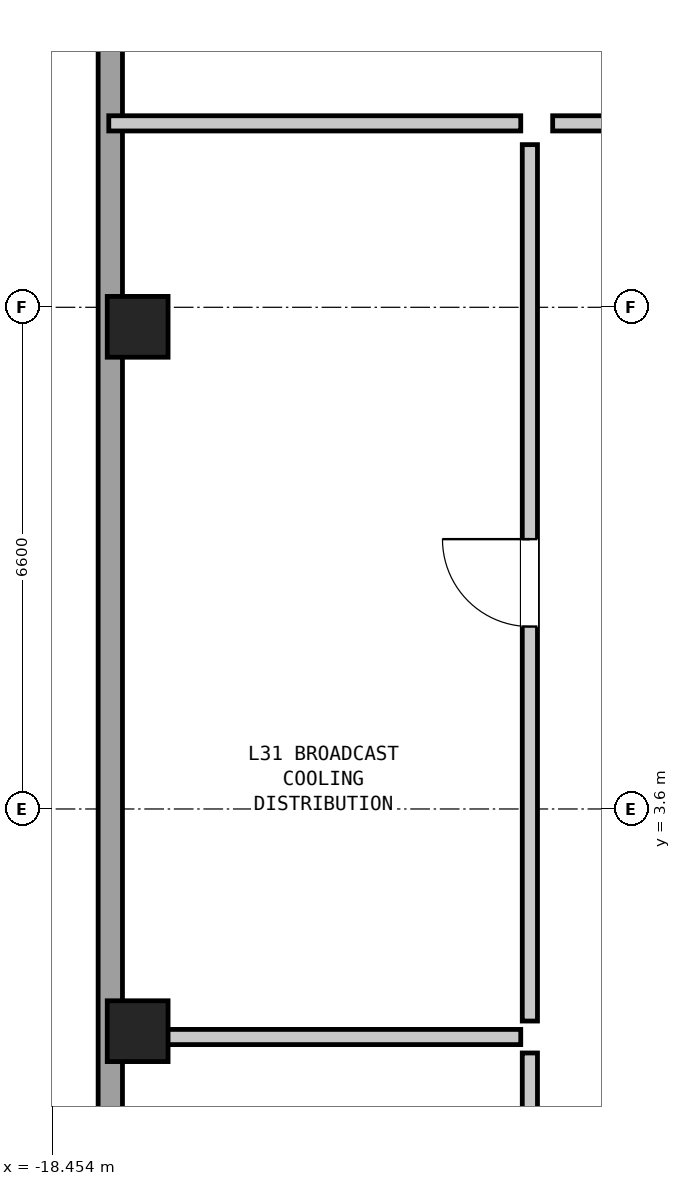
"""IFC4 building model, lengths in metres.
Left out: names, types, materials, properties, quantities, classifications, styles, units other than length and angle.
Written with IfcOpenShell. Run it as: python <this file> out.ifc"""

import sys

from ifc_helpers import new_model, si_unit, direction, frame, frame_2d, origin, origin_2d, place, context, subcontext, project, spatial, rectangle, hollow_rectangle, extrude, element, fill, save


model = new_model("IFC4")
c1 = context("Model", 3, precision=1e-05, world=origin(), true_north=direction((0.0, 1.0)))
c2 = subcontext(c1, "Body", "Model", "MODEL_VIEW")
j1 = project(units=[si_unit("LENGTHUNIT", "METRE"), si_unit("PLANEANGLEUNIT", "RADIAN")], contexts=[c1])
p1 = place(None, origin())
s1 = spatial("IfcSite", under=j1, at=p1, CompositionType="ELEMENT")
p2 = place(p1, origin())
s2 = spatial("IfcBuilding", under=s1, at=p2, CompositionType="ELEMENT")
p3 = place(p2, frame((0.0, 0.0, 108.45)))
s3 = spatial("IfcBuildingStorey", under=s2, at=p3, CompositionType="ELEMENT", Elevation=108.45)
for number, where, z_axis, x_axis in (
    (1, (-17.33, 9.943, 0.0), (0.0, 0.0, 1.0), (0.0, 1.0, 0.0)),
    (2, (-17.33, 0.677, 0.0), (0.0, 0.0, 1.0), (0.0, 1.0, 0.0)),
):
    element("IfcColumn", number, at=place(p3, frame(where, z_axis=z_axis, x_axis=x_axis)), inside=s3, PredefinedType="COLUMN", context=c2, shape_type="SweptSolid", body=[
        extrude(hollow_rectangle(XDim=0.8, YDim=0.8, WallThickness=0.05, at=origin_2d()), origin(), (0.0, 0.0, 1.0), 4.35),
    ])
p4 = place(p3, frame((-17.69, -8.202, 0.0), z_axis=(0.0, 0.0, 1.0), x_axis=(0.0, 1.0, 0.0)))
e3 = element("IfcWall", 3, at=p4, inside=s3, PredefinedType="SOLIDWALL", context=c2, shape_type="SweptSolid", body=[
    extrude(rectangle(XDim=27.024, YDim=0.32, at=frame_2d((13.512, 0.0))), origin(), (0.0, 0.0, 1.0), 2.31),
])
p5 = place(p3, frame((-11.87, 12.62, 0.0), z_axis=(0.0, 0.0, 1.0), x_axis=(1.0, 0.0, 0.0)))
e4 = element("IfcWall", 4, at=p5, inside=s3, PredefinedType="PARTITIONING", context=c2, shape_type="SweptSolid", body=[
    extrude(rectangle(XDim=5.89, YDim=0.2, at=frame_2d((2.945, 0.0))), origin(), (0.0, 0.0, 1.0), 4.13),
])
p6 = place(p5, frame((2.37, 0.0, 0.0)))
e5 = element("IfcOpeningElement", 5, at=p6, cuts=e4, PredefinedType="OPENING", context=c2, shape_type="SweptSolid", body=[
    extrude(rectangle(XDim=1.15, YDim=2.1, at=frame_2d((0.575, 1.05))), frame((0.0, 0.112, 0.0), z_axis=(0.0, -1.0, 0.0), x_axis=(1.0, 0.0, 0.0)), (0.0, 0.0, 1.0), 0.224),
])
p7 = place(p3, frame((-17.71, 12.62, 0.0), z_axis=(0.0, 0.0, 1.0), x_axis=(1.0, 0.0, 0.0)))
e6 = element("IfcWall", 6, at=p7, inside=s3, PredefinedType="PARTITIONING", context=c2, shape_type="SweptSolid", body=[
    extrude(rectangle(XDim=5.42, YDim=0.2, at=frame_2d((2.71, 0.0))), origin(), (0.0, 0.0, 1.0), 4.13),
])
p8 = place(p3, frame((-17.71, 0.6, 0.0), z_axis=(0.0, 0.0, 1.0), x_axis=(1.0, 0.0, 0.0)))
e7 = element("IfcWall", 7, at=p8, inside=s3, PredefinedType="PARTITIONING", context=c2, shape_type="SweptSolid", body=[
    extrude(rectangle(XDim=5.42, YDim=0.2, at=frame_2d((2.71, 0.0))), origin(), (0.0, 0.0, 1.0), 2.31),
])
p9 = place(p3, frame((-12.17, -11.14, 0.0), z_axis=(0.0, 0.0, 1.0), x_axis=(0.0, 1.0, 0.0)))
e8 = element("IfcWall", 8, at=p9, inside=s3, PredefinedType="PARTITIONING", context=c2, shape_type="SweptSolid", body=[
    extrude(rectangle(XDim=11.53, YDim=0.2, at=frame_2d((5.765, 0.0))), origin(), (0.0, 0.0, 1.0), 2.31),
])
p10 = place(p9, frame((5.19, 0.0, 0.0)))
e9 = element("IfcOpeningElement", 9, at=p10, cuts=e8, PredefinedType="OPENING", context=c2, shape_type="SweptSolid", body=[
    extrude(rectangle(XDim=1.15, YDim=2.1, at=frame_2d((0.575, 1.05))), frame((0.0, 0.112, 0.0), z_axis=(0.0, -1.0, 0.0), x_axis=(1.0, 0.0, 0.0)), (0.0, 0.0, 1.0), 0.224),
])
p11 = place(p3, frame((-12.17, 0.81, 0.0), z_axis=(0.0, 0.0, 1.0), x_axis=(0.0, 1.0, 0.0)))
e10 = element("IfcWall", 10, at=p11, inside=s3, PredefinedType="PARTITIONING", context=c2, shape_type="SweptSolid", body=[
    extrude(rectangle(XDim=11.53, YDim=0.2, at=frame_2d((5.765, 0.0))), origin(), (0.0, 0.0, 1.0), 4.13),
])
p12 = place(p11, frame((5.19, 0.0, 0.0)))
e11 = element("IfcOpeningElement", 11, at=p12, cuts=e10, PredefinedType="OPENING", context=c2, shape_type="SweptSolid", body=[
    extrude(rectangle(XDim=1.15, YDim=2.1, at=frame_2d((0.575, 1.05))), frame((0.0, 0.112, 0.0), z_axis=(0.0, -1.0, 0.0), x_axis=(1.0, 0.0, 0.0)), (0.0, 0.0, 1.0), 0.224),
])
p13 = place(p12, origin())
e12 = element("IfcDoor", 12, at=p13, inside=s3, OperationType="SINGLE_SWING_RIGHT", PredefinedType="DOOR", context=c2, shape_type="SweptSolid", body=[
    extrude(rectangle(XDim=1.15, YDim=2.1, at=frame_2d((0.575, 1.05))), frame((0.0, 0.025, 0.0), z_axis=(0.0, -1.0, 0.0), x_axis=(1.0, 0.0, 0.0)), (0.0, 0.0, 1.0), 0.05),
])
fill(e11, e12)
save(model, sys.argv[1])
